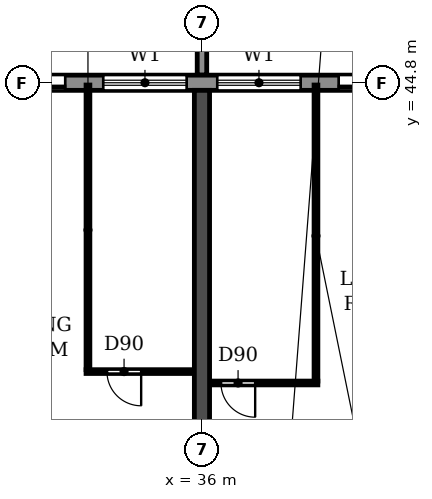
"""IFC4 building model, lengths in metres.
Left out: names, types, materials, properties, quantities, classifications, styles, units other than length and angle.
Written with IfcOpenShell. Run it as: python <this file> out.ifc"""

import sys

from ifc_helpers import new_model, si_unit, direction, frame, frame_2d, origin, place, context, subcontext, project, spatial, polyline, rectangle, outline, extrude, source, transform, mapped, element, fill, save


model = new_model("IFC4")
c1 = context("Model", 3, precision=1e-05, world=origin(), true_north=direction((0.0, 1.0)))
c2 = subcontext(c1, "Body", "Model", "MODEL_VIEW")
j1 = project(units=[si_unit("LENGTHUNIT", "METRE"), si_unit("PLANEANGLEUNIT", "RADIAN")], contexts=[c1])
p1 = place(None, origin())
s1 = spatial("IfcSite", under=j1, at=p1, CompositionType="ELEMENT")
p2 = place(p1, origin())
s2 = spatial("IfcBuilding", under=s1, at=p2, CompositionType="ELEMENT")
p3 = place(p2, frame((0.0, 0.0, 26.7)))
s3 = spatial("IfcBuildingStorey", under=s2, at=p3, CompositionType="ELEMENT", Elevation=26.7)
p4 = place(p3, frame((36.0, 30.55, 0.0), z_axis=(0.0, 0.0, 1.0), x_axis=(0.0, 1.0, 0.0)))
e1 = element("IfcWall", 1, at=p4, inside=s3, PredefinedType="SHEAR", context=c2, shape_type="SweptSolid", body=[
    extrude(rectangle(XDim=14.05, YDim=0.4, at=frame_2d((7.025, 0.0))), origin(), (0.0, 0.0, 1.0), 3.05),
])
p5 = place(p3, frame((97.317, 44.8, 0.0), z_axis=(0.0, 0.0, 1.0), x_axis=(-1.0, 0.0, 0.0)))
e2 = element("IfcWall", 2, at=p5, inside=s3, PredefinedType="STANDARD", context=c2, shape_type="SweptSolid", body=[
    extrude(rectangle(XDim=92.634, YDim=0.4, at=frame_2d((46.317, 0.0))), origin(), (0.0, 0.0, 1.0), 3.05),
])
p6 = place(p5, frame((88.717, 0.0, 0.9)))
e3 = element("IfcOpeningElement", 3, at=p6, cuts=e2, PredefinedType="OPENING", context=c2, shape_type="SweptSolid", body=[
    extrude(rectangle(XDim=2.2, YDim=1.5, at=frame_2d((1.1, 0.75))), frame((0.0, 0.21, 0.0), z_axis=(0.0, -1.0, 0.0), x_axis=(1.0, 0.0, 0.0)), (0.0, 0.0, 1.0), 0.42),
])
p7 = place(p5, frame((85.917, 0.0, 0.0)))
e4 = element("IfcOpeningElement", 4, at=p7, cuts=e2, PredefinedType="OPENING", context=c2, shape_type="SweptSolid", body=[
    extrude(rectangle(XDim=1.8, YDim=2.4, at=frame_2d((0.9, 1.2))), frame((0.0, 0.21, 0.0), z_axis=(0.0, -1.0, 0.0), x_axis=(1.0, 0.0, 0.0)), (0.0, 0.0, 1.0), 0.42),
])
p8 = place(p5, frame((82.717, 0.0, 0.9)))
e5 = element("IfcOpeningElement", 5, at=p8, cuts=e2, PredefinedType="OPENING", context=c2, shape_type="SweptSolid", body=[
    extrude(rectangle(XDim=2.2, YDim=1.5, at=frame_2d((1.1, 0.75))), frame((0.0, 0.21, 0.0), z_axis=(0.0, -1.0, 0.0), x_axis=(1.0, 0.0, 0.0)), (0.0, 0.0, 1.0), 0.42),
])
p9 = place(p5, frame((79.717, 0.0, 0.9)))
e6 = element("IfcOpeningElement", 6, at=p9, cuts=e2, PredefinedType="OPENING", context=c2, shape_type="SweptSolid", body=[
    extrude(rectangle(XDim=2.2, YDim=1.5, at=frame_2d((1.1, 0.75))), frame((0.0, 0.21, 0.0), z_axis=(0.0, -1.0, 0.0), x_axis=(1.0, 0.0, 0.0)), (0.0, 0.0, 1.0), 0.42),
])
p10 = place(p5, frame((76.917, 0.0, 0.0)))
e7 = element("IfcOpeningElement", 7, at=p10, cuts=e2, PredefinedType="OPENING", context=c2, shape_type="SweptSolid", body=[
    extrude(rectangle(XDim=1.8, YDim=2.4, at=frame_2d((0.9, 1.2))), frame((0.0, 0.21, 0.0), z_axis=(0.0, -1.0, 0.0), x_axis=(1.0, 0.0, 0.0)), (0.0, 0.0, 1.0), 0.42),
])
p11 = place(p5, frame((73.717, 0.0, 0.9)))
e8 = element("IfcOpeningElement", 8, at=p11, cuts=e2, PredefinedType="OPENING", context=c2, shape_type="SweptSolid", body=[
    extrude(rectangle(XDim=2.2, YDim=1.5, at=frame_2d((1.1, 0.75))), frame((0.0, 0.21, 0.0), z_axis=(0.0, -1.0, 0.0), x_axis=(1.0, 0.0, 0.0)), (0.0, 0.0, 1.0), 0.42),
])
p12 = place(p5, frame((70.717, 0.0, 0.9)))
e9 = element("IfcOpeningElement", 9, at=p12, cuts=e2, PredefinedType="OPENING", context=c2, shape_type="SweptSolid", body=[
    extrude(rectangle(XDim=2.2, YDim=1.5, at=frame_2d((1.1, 0.75))), frame((0.0, 0.21, 0.0), z_axis=(0.0, -1.0, 0.0), x_axis=(1.0, 0.0, 0.0)), (0.0, 0.0, 1.0), 0.42),
])
p13 = place(p5, frame((67.717, 0.0, 0.9)))
e10 = element("IfcOpeningElement", 10, at=p13, cuts=e2, PredefinedType="OPENING", context=c2, shape_type="SweptSolid", body=[
    extrude(rectangle(XDim=2.2, YDim=1.5, at=frame_2d((1.1, 0.75))), frame((0.0, 0.21, 0.0), z_axis=(0.0, -1.0, 0.0), x_axis=(1.0, 0.0, 0.0)), (0.0, 0.0, 1.0), 0.42),
])
p14 = place(p5, frame((64.917, 0.0, 0.0)))
e11 = element("IfcOpeningElement", 11, at=p14, cuts=e2, PredefinedType="OPENING", context=c2, shape_type="SweptSolid", body=[
    extrude(rectangle(XDim=1.8, YDim=2.4, at=frame_2d((0.9, 1.2))), frame((0.0, 0.21, 0.0), z_axis=(0.0, -1.0, 0.0), x_axis=(1.0, 0.0, 0.0)), (0.0, 0.0, 1.0), 0.42),
])
p15 = place(p5, frame((61.717, 0.0, 0.9)))
e12 = element("IfcOpeningElement", 12, at=p15, cuts=e2, PredefinedType="OPENING", context=c2, shape_type="SweptSolid", body=[
    extrude(rectangle(XDim=2.2, YDim=1.5, at=frame_2d((1.1, 0.75))), frame((0.0, 0.21, 0.0), z_axis=(0.0, -1.0, 0.0), x_axis=(1.0, 0.0, 0.0)), (0.0, 0.0, 1.0), 0.42),
])
p16 = place(p5, frame((58.717, 0.0, 0.9)))
e13 = element("IfcOpeningElement", 13, at=p16, cuts=e2, PredefinedType="OPENING", context=c2, shape_type="SweptSolid", body=[
    extrude(rectangle(XDim=2.2, YDim=1.5, at=frame_2d((1.1, 0.75))), frame((0.0, 0.21, 0.0), z_axis=(0.0, -1.0, 0.0), x_axis=(1.0, 0.0, 0.0)), (0.0, 0.0, 1.0), 0.42),
])
p17 = place(p5, frame((55.917, 0.0, 0.0)))
e14 = element("IfcOpeningElement", 14, at=p17, cuts=e2, PredefinedType="OPENING", context=c2, shape_type="SweptSolid", body=[
    extrude(rectangle(XDim=1.8, YDim=2.4, at=frame_2d((0.9, 1.2))), frame((0.0, 0.21, 0.0), z_axis=(0.0, -1.0, 0.0), x_axis=(1.0, 0.0, 0.0)), (0.0, 0.0, 1.0), 0.42),
])
p18 = place(p5, frame((52.917, 0.0, 0.0)))
e15 = element("IfcOpeningElement", 15, at=p18, cuts=e2, PredefinedType="OPENING", context=c2, shape_type="SweptSolid", body=[
    extrude(rectangle(XDim=1.8, YDim=2.4, at=frame_2d((0.9, 1.2))), frame((0.0, 0.21, 0.0), z_axis=(0.0, -1.0, 0.0), x_axis=(1.0, 0.0, 0.0)), (0.0, 0.0, 1.0), 0.42),
])
p19 = place(p5, frame((49.717, 0.0, 0.9)))
e16 = element("IfcOpeningElement", 16, at=p19, cuts=e2, PredefinedType="OPENING", context=c2, shape_type="SweptSolid", body=[
    extrude(rectangle(XDim=2.2, YDim=1.5, at=frame_2d((1.1, 0.75))), frame((0.0, 0.21, 0.0), z_axis=(0.0, -1.0, 0.0), x_axis=(1.0, 0.0, 0.0)), (0.0, 0.0, 1.0), 0.42),
])
p20 = place(p5, frame((46.917, 0.0, 0.0)))
e17 = element("IfcOpeningElement", 17, at=p20, cuts=e2, PredefinedType="OPENING", context=c2, shape_type="SweptSolid", body=[
    extrude(rectangle(XDim=1.8, YDim=2.4, at=frame_2d((0.9, 1.2))), frame((0.0, 0.21, 0.0), z_axis=(0.0, -1.0, 0.0), x_axis=(1.0, 0.0, 0.0)), (0.0, 0.0, 1.0), 0.42),
])
p21 = place(p5, frame((43.717, 0.0, 0.9)))
e18 = element("IfcOpeningElement", 18, at=p21, cuts=e2, PredefinedType="OPENING", context=c2, shape_type="SweptSolid", body=[
    extrude(rectangle(XDim=2.2, YDim=1.5, at=frame_2d((1.1, 0.75))), frame((0.0, 0.21, 0.0), z_axis=(0.0, -1.0, 0.0), x_axis=(1.0, 0.0, 0.0)), (0.0, 0.0, 1.0), 0.42),
])
p22 = place(p5, frame((40.717, 0.0, 0.9)))
e19 = element("IfcOpeningElement", 19, at=p22, cuts=e2, PredefinedType="OPENING", context=c2, shape_type="SweptSolid", body=[
    extrude(rectangle(XDim=2.2, YDim=1.5, at=frame_2d((1.1, 0.75))), frame((0.0, 0.21, 0.0), z_axis=(0.0, -1.0, 0.0), x_axis=(1.0, 0.0, 0.0)), (0.0, 0.0, 1.0), 0.42),
])
p23 = place(p5, frame((37.917, 0.0, 0.0)))
e20 = element("IfcOpeningElement", 20, at=p23, cuts=e2, PredefinedType="OPENING", context=c2, shape_type="SweptSolid", body=[
    extrude(rectangle(XDim=1.8, YDim=2.4, at=frame_2d((0.9, 1.2))), frame((0.0, 0.21, 0.0), z_axis=(0.0, -1.0, 0.0), x_axis=(1.0, 0.0, 0.0)), (0.0, 0.0, 1.0), 0.42),
])
p24 = place(p5, frame((34.917, 0.0, 0.0)))
e21 = element("IfcOpeningElement", 21, at=p24, cuts=e2, PredefinedType="OPENING", context=c2, shape_type="SweptSolid", body=[
    extrude(rectangle(XDim=1.8, YDim=2.4, at=frame_2d((0.9, 1.2))), frame((0.0, 0.21, 0.0), z_axis=(0.0, -1.0, 0.0), x_axis=(1.0, 0.0, 0.0)), (0.0, 0.0, 1.0), 0.42),
])
p25 = place(p5, frame((31.717, 0.0, 0.9)))
e22 = element("IfcOpeningElement", 22, at=p25, cuts=e2, PredefinedType="OPENING", context=c2, shape_type="SweptSolid", body=[
    extrude(rectangle(XDim=2.2, YDim=1.5, at=frame_2d((1.1, 0.75))), frame((0.0, 0.21, 0.0), z_axis=(0.0, -1.0, 0.0), x_axis=(1.0, 0.0, 0.0)), (0.0, 0.0, 1.0), 0.42),
])
p26 = place(p5, frame((28.717, 0.0, 0.9)))
e23 = element("IfcOpeningElement", 23, at=p26, cuts=e2, PredefinedType="OPENING", context=c2, shape_type="SweptSolid", body=[
    extrude(rectangle(XDim=2.2, YDim=1.5, at=frame_2d((1.1, 0.75))), frame((0.0, 0.21, 0.0), z_axis=(0.0, -1.0, 0.0), x_axis=(1.0, 0.0, 0.0)), (0.0, 0.0, 1.0), 0.42),
])
p27 = place(p5, frame((25.717, 0.0, 0.9)))
e24 = element("IfcOpeningElement", 24, at=p27, cuts=e2, PredefinedType="OPENING", context=c2, shape_type="SweptSolid", body=[
    extrude(rectangle(XDim=2.2, YDim=1.5, at=frame_2d((1.1, 0.75))), frame((0.0, 0.21, 0.0), z_axis=(0.0, -1.0, 0.0), x_axis=(1.0, 0.0, 0.0)), (0.0, 0.0, 1.0), 0.42),
])
p28 = place(p5, frame((22.717, 0.0, 0.9)))
e25 = element("IfcOpeningElement", 25, at=p28, cuts=e2, PredefinedType="OPENING", context=c2, shape_type="SweptSolid", body=[
    extrude(rectangle(XDim=2.2, YDim=1.5, at=frame_2d((1.1, 0.75))), frame((0.0, 0.21, 0.0), z_axis=(0.0, -1.0, 0.0), x_axis=(1.0, 0.0, 0.0)), (0.0, 0.0, 1.0), 0.42),
])
p29 = place(p5, frame((19.917, 0.0, 0.0)))
e26 = element("IfcOpeningElement", 26, at=p29, cuts=e2, PredefinedType="OPENING", context=c2, shape_type="SweptSolid", body=[
    extrude(rectangle(XDim=1.8, YDim=2.4, at=frame_2d((0.9, 1.2))), frame((0.0, 0.21, 0.0), z_axis=(0.0, -1.0, 0.0), x_axis=(1.0, 0.0, 0.0)), (0.0, 0.0, 1.0), 0.42),
])
p30 = place(p5, frame((16.717, 0.0, 0.9)))
e27 = element("IfcOpeningElement", 27, at=p30, cuts=e2, PredefinedType="OPENING", context=c2, shape_type="SweptSolid", body=[
    extrude(rectangle(XDim=2.2, YDim=1.5, at=frame_2d((1.1, 0.75))), frame((0.0, 0.21, 0.0), z_axis=(0.0, -1.0, 0.0), x_axis=(1.0, 0.0, 0.0)), (0.0, 0.0, 1.0), 0.42),
])
p31 = place(p5, frame((13.717, 0.0, 0.9)))
e28 = element("IfcOpeningElement", 28, at=p31, cuts=e2, PredefinedType="OPENING", context=c2, shape_type="SweptSolid", body=[
    extrude(rectangle(XDim=2.2, YDim=1.5, at=frame_2d((1.1, 0.75))), frame((0.0, 0.21, 0.0), z_axis=(0.0, -1.0, 0.0), x_axis=(1.0, 0.0, 0.0)), (0.0, 0.0, 1.0), 0.42),
])
p32 = place(p5, frame((10.717, 0.0, 0.9)))
e29 = element("IfcOpeningElement", 29, at=p32, cuts=e2, PredefinedType="OPENING", context=c2, shape_type="SweptSolid", body=[
    extrude(rectangle(XDim=2.2, YDim=1.5, at=frame_2d((1.1, 0.75))), frame((0.0, 0.21, 0.0), z_axis=(0.0, -1.0, 0.0), x_axis=(1.0, 0.0, 0.0)), (0.0, 0.0, 1.0), 0.42),
])
p33 = place(p5, frame((7.917, 0.0, 0.0)))
e30 = element("IfcOpeningElement", 30, at=p33, cuts=e2, PredefinedType="OPENING", context=c2, shape_type="SweptSolid", body=[
    extrude(rectangle(XDim=1.8, YDim=2.4, at=frame_2d((0.9, 1.2))), frame((0.0, 0.21, 0.0), z_axis=(0.0, -1.0, 0.0), x_axis=(1.0, 0.0, 0.0)), (0.0, 0.0, 1.0), 0.42),
])
p34 = place(p5, frame((4.917, 0.0, 0.0)))
e31 = element("IfcOpeningElement", 31, at=p34, cuts=e2, PredefinedType="OPENING", context=c2, shape_type="SweptSolid", body=[
    extrude(rectangle(XDim=1.8, YDim=2.4, at=frame_2d((0.9, 1.2))), frame((0.0, 0.21, 0.0), z_axis=(0.0, -1.0, 0.0), x_axis=(1.0, 0.0, 0.0)), (0.0, 0.0, 1.0), 0.42),
])
p35 = place(p5, frame((1.717, 0.0, 0.9)))
e32 = element("IfcOpeningElement", 32, at=p35, cuts=e2, PredefinedType="OPENING", context=c2, shape_type="SweptSolid", body=[
    extrude(rectangle(XDim=2.2, YDim=1.5, at=frame_2d((1.1, 0.75))), frame((0.0, 0.21, 0.0), z_axis=(0.0, -1.0, 0.0), x_axis=(1.0, 0.0, 0.0)), (0.0, 0.0, 1.0), 0.42),
])
m1 = source(origin(), c2, "Body", "SweptSolid", [
    extrude(outline(polyline([(0.0, 0.0), (0.25, 0.0), (0.25, 3.1), (0.0, 3.1), (0.0, 0.0)])), origin(), (0.0, 0.0, 1.0), 3.1),
])
p36 = place(p3, frame((35.875, 45.0, 0.0)))
e33 = element("IfcWall", 33, at=p36, inside=s3, PredefinedType="STANDARD", context=c2, shape_type="MappedRepresentation", body=[
    mapped(m1, transform((0.0, 0.0, 0.0))),
])
p37 = place(p3, frame((36.21, 36.9, 0.0), z_axis=(0.0, 0.0, 1.0), x_axis=(1.0, 0.0, 0.0)))
e34 = element("IfcWall", 34, at=p37, inside=s3, PredefinedType="PARTITIONING", context=c2, shape_type="SweptSolid", body=[
    extrude(rectangle(XDim=2.84, YDim=0.1, at=frame_2d((1.42, 0.0))), origin(), (0.0, 0.0, 1.0), 3.05),
])
p38 = place(p37, frame((0.29, 0.0, 0.0)))
e35 = element("IfcOpeningElement", 35, at=p38, cuts=e34, PredefinedType="OPENING", context=c2, shape_type="SweptSolid", body=[
    extrude(rectangle(XDim=0.9, YDim=2.1, at=frame_2d((0.45, 1.05))), frame((0.0, 0.06, 0.0), z_axis=(0.0, -1.0, 0.0), x_axis=(1.0, 0.0, 0.0)), (0.0, 0.0, 1.0), 0.12),
])
p39 = place(p3, frame((32.95, 37.2, 0.0), z_axis=(0.0, 0.0, 1.0), x_axis=(1.0, 0.0, 0.0)))
e36 = element("IfcWall", 36, at=p39, inside=s3, PredefinedType="PARTITIONING", context=c2, shape_type="SweptSolid", body=[
    extrude(rectangle(XDim=2.84, YDim=0.1, at=frame_2d((1.42, 0.0))), origin(), (0.0, 0.0, 1.0), 3.05),
])
p40 = place(p39, frame((0.55, 0.0, 0.0)))
e37 = element("IfcOpeningElement", 37, at=p40, cuts=e36, PredefinedType="OPENING", context=c2, shape_type="SweptSolid", body=[
    extrude(rectangle(XDim=0.9, YDim=2.1, at=frame_2d((0.45, 1.05))), frame((0.0, 0.06, 0.0), z_axis=(0.0, -1.0, 0.0), x_axis=(1.0, 0.0, 0.0)), (0.0, 0.0, 1.0), 0.12),
])
p41 = place(p3, frame((33.0, 37.25, 0.0), z_axis=(0.0, 0.0, 1.0), x_axis=(0.0, 1.0, 0.0)))
e38 = element("IfcWall", 38, at=p41, inside=s3, PredefinedType="PARTITIONING", context=c2, shape_type="SweptSolid", body=[
    extrude(rectangle(XDim=7.49, YDim=0.1, at=frame_2d((3.745, 0.0))), origin(), (0.0, 0.0, 1.0), 3.05),
])
p42 = place(p3, frame((39.0, 36.95, 0.0), z_axis=(0.0, 0.0, 1.0), x_axis=(0.0, 1.0, 0.0)))
e39 = element("IfcWall", 39, at=p42, inside=s3, PredefinedType="PARTITIONING", context=c2, shape_type="SweptSolid", body=[
    extrude(rectangle(XDim=7.79, YDim=0.1, at=frame_2d((3.895, 0.0))), origin(), (0.0, 0.0, 1.0), 3.05),
])
p43 = place(p14, origin())
e40 = element("IfcDoor", 40, at=p43, inside=s3, OperationType="DOUBLE_DOOR_SLIDING", PredefinedType="DOOR", context=c2, shape_type="SweptSolid", body=[
    extrude(rectangle(XDim=1.8, YDim=2.4, at=frame_2d((0.9, 1.2))), frame((0.0, 0.025, 0.0), z_axis=(0.0, -1.0, 0.0), x_axis=(1.0, 0.0, 0.0)), (0.0, 0.0, 1.0), 0.05),
])
fill(e11, e40)
p44 = place(p15, origin())
e41 = element("IfcWindow", 41, at=p44, inside=s3, PartitioningType="DOUBLE_PANEL_HORIZONTAL", PredefinedType="WINDOW", context=c2, shape_type="SweptSolid", body=[
    extrude(rectangle(XDim=2.2, YDim=1.5, at=frame_2d((1.1, 0.75))), frame((0.0, 0.03, 0.0), z_axis=(0.0, -1.0, 0.0), x_axis=(1.0, 0.0, 0.0)), (0.0, 0.0, 1.0), 0.06),
])
fill(e12, e41)
p45 = place(p16, origin())
e42 = element("IfcWindow", 42, at=p45, inside=s3, PartitioningType="DOUBLE_PANEL_HORIZONTAL", PredefinedType="WINDOW", context=c2, shape_type="SweptSolid", body=[
    extrude(rectangle(XDim=2.2, YDim=1.5, at=frame_2d((1.1, 0.75))), frame((0.0, 0.03, 0.0), z_axis=(0.0, -1.0, 0.0), x_axis=(1.0, 0.0, 0.0)), (0.0, 0.0, 1.0), 0.06),
])
fill(e13, e42)
p46 = place(p17, origin())
e43 = element("IfcDoor", 43, at=p46, inside=s3, OperationType="DOUBLE_DOOR_SLIDING", PredefinedType="DOOR", context=c2, shape_type="SweptSolid", body=[
    extrude(rectangle(XDim=1.8, YDim=2.4, at=frame_2d((0.9, 1.2))), frame((0.0, 0.025, 0.0), z_axis=(0.0, -1.0, 0.0), x_axis=(1.0, 0.0, 0.0)), (0.0, 0.0, 1.0), 0.05),
])
fill(e14, e43)
p47 = place(p40, frame((0.9, 0.0, 0.0), z_axis=(0.0, 0.0, 1.0), x_axis=(-1.0, 0.0, 0.0)))
e44 = element("IfcDoor", 44, at=p47, inside=s3, OperationType="SINGLE_SWING_LEFT", PredefinedType="DOOR", context=c2, shape_type="SweptSolid", body=[
    extrude(rectangle(XDim=0.9, YDim=2.1, at=frame_2d((0.45, 1.05))), frame((0.0, 0.025, 0.0), z_axis=(0.0, -1.0, 0.0), x_axis=(1.0, 0.0, 0.0)), (0.0, 0.0, 1.0), 0.05),
])
fill(e37, e44)
p48 = place(p38, frame((0.9, 0.0, 0.0), z_axis=(0.0, 0.0, 1.0), x_axis=(-1.0, 0.0, 0.0)))
e45 = element("IfcDoor", 45, at=p48, inside=s3, OperationType="SINGLE_SWING_LEFT", PredefinedType="DOOR", context=c2, shape_type="SweptSolid", body=[
    extrude(rectangle(XDim=0.9, YDim=2.1, at=frame_2d((0.45, 1.05))), frame((0.0, 0.025, 0.0), z_axis=(0.0, -1.0, 0.0), x_axis=(1.0, 0.0, 0.0)), (0.0, 0.0, 1.0), 0.05),
])
fill(e35, e45)
save(model, sys.argv[1])
